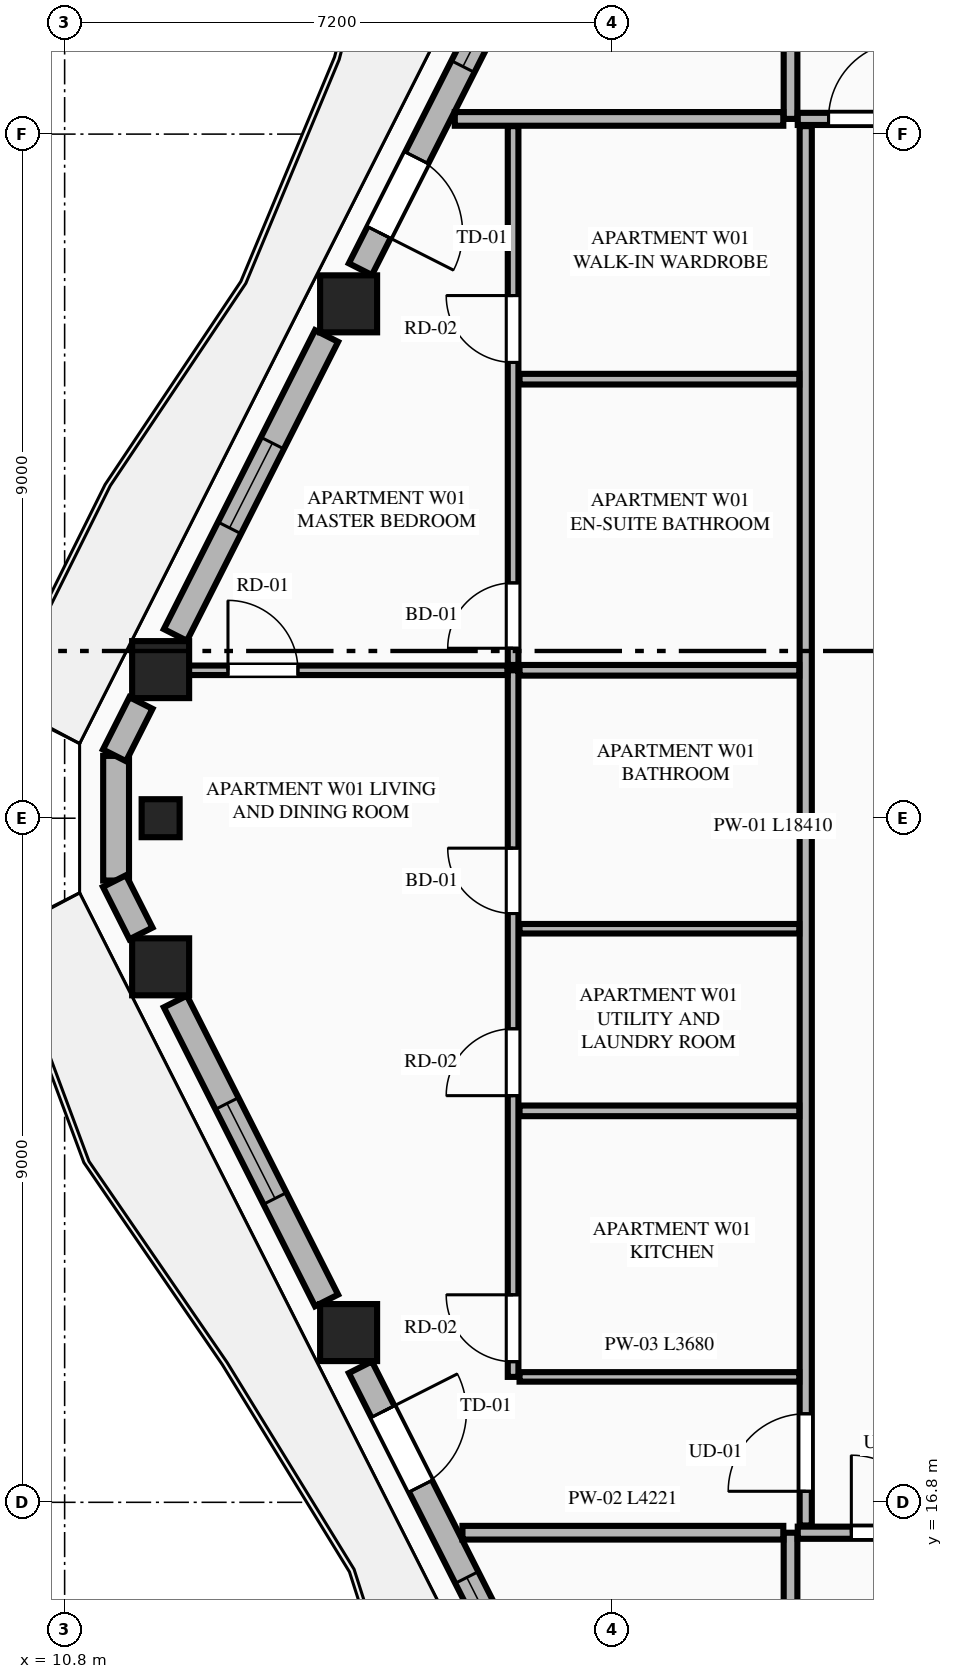
"""IFC4 building model, lengths in metres.
Left out: names, types, materials, properties, quantities, classifications, styles, units other than length and angle.
Written with IfcOpenShell. Run it as: python <this file> out.ifc"""

import sys

from ifc_helpers import new_model, si_unit, direction, frame, frame_2d, origin, origin_2d, place, context, subcontext, project, spatial, rectangle, extrude, element, fill, save


model = new_model("IFC4")
c1 = context("Model", 3, precision=1e-05, world=origin(), true_north=direction((0.0, 1.0)))
c2 = subcontext(c1, "Body", "Model", "MODEL_VIEW")
j1 = project(units=[si_unit("LENGTHUNIT", "METRE"), si_unit("PLANEANGLEUNIT", "RADIAN")], contexts=[c1])
p1 = place(None, origin())
s1 = spatial("IfcSite", under=j1, at=p1, CompositionType="ELEMENT")
p2 = place(p1, origin())
s2 = spatial("IfcBuilding", under=s1, at=p2, CompositionType="ELEMENT")
p3 = place(p2, frame((0.0, 0.0, 237.95)))
s3 = spatial("IfcBuildingStorey", under=s2, at=p3, CompositionType="ELEMENT", Elevation=237.95)
for number, where, z_axis, x_axis in (
    (1, (14.536, 32.567, 0.0), (0.0, 0.0, 1.0), (1.0, 0.0, 0.0)),
    (2, (12.063, 27.755, 0.0), (0.0, 0.0, 1.0), (1.0, 0.0, 0.0)),
    (3, (12.063, 23.845, 0.0), (0.0, 0.0, 1.0), (1.0, 0.0, 0.0)),
    (4, (14.536, 19.033, 0.0), (0.0, 0.0, 1.0), (1.0, 0.0, 0.0)),
):
    element("IfcColumn", number, at=place(p3, frame(where, z_axis=z_axis, x_axis=x_axis)), inside=s3, PredefinedType="COLUMN", context=c2, shape_type="SweptSolid", body=[
        extrude(rectangle(XDim=0.75, YDim=0.75, at=origin_2d()), origin(), (0.0, 0.0, 1.0), 3.65),
    ])
p4 = place(p3, frame((12.063, 25.8, 0.0), z_axis=(0.0, 0.0, 1.0), x_axis=(0.0, -1.0, 0.0)))
e5 = element("IfcColumn", 5, at=p4, inside=s3, PredefinedType="PILASTER", context=c2, shape_type="SweptSolid", body=[
    extrude(rectangle(XDim=0.5, YDim=0.35, at=origin_2d()), origin(), (0.0, 0.0, 1.0), 3.65),
])
p5 = place(p3, frame((11.477, 26.62, 0.0), z_axis=(0.0, 0.0, 1.0), x_axis=(0.0, -1.0, 0.0)))
e6 = element("IfcWall", 6, at=p5, inside=s3, PredefinedType="STANDARD", context=c2, shape_type="SweptSolid", body=[
    extrude(rectangle(XDim=1.64, YDim=0.34, at=frame_2d((0.82, 0.0))), origin(), (0.0, 0.0, 1.0), 3.45),
])
p6 = place(p3, frame((16.768, 37.127, 0.0), z_axis=(0.0, 0.0, 1.0), x_axis=(-0.451581819983, -0.892229712496, 0.0)))
e7 = element("IfcWall", 7, at=p6, inside=s3, PredefinedType="STANDARD", context=c2, shape_type="SweptSolid", body=[
    extrude(rectangle(XDim=4.6, YDim=0.34, at=frame_2d((2.3, 0.0))), origin(), (0.0, 0.0, 1.0), 2.983),
])
p7 = place(p6, frame((2.958, 0.0, 0.0)))
e8 = element("IfcOpeningElement", 8, at=p7, cuts=e7, PredefinedType="OPENING", context=c2, shape_type="SweptSolid", body=[
    extrude(rectangle(XDim=1.1, YDim=2.25, at=frame_2d((0.55, 1.125))), frame((0.0, 0.18, 0.0), z_axis=(0.0, -1.0, 0.0), x_axis=(1.0, 0.0, 0.0)), (0.0, 0.0, 1.0), 0.36),
])
p8 = place(p6, frame((0.512, 0.0, 0.75)))
e9 = element("IfcOpeningElement", 9, at=p8, cuts=e7, PredefinedType="OPENING", context=c2, shape_type="SweptSolid", body=[
    extrude(rectangle(XDim=1.1, YDim=2.0, at=frame_2d((0.55, 1.0))), frame((0.0, 0.18, 0.0), z_axis=(0.0, -1.0, 0.0), x_axis=(1.0, 0.0, 0.0)), (0.0, 0.0, 1.0), 0.36),
])
p9 = place(p3, frame((14.246, 32.144, 0.0), z_axis=(0.0, 0.0, 1.0), x_axis=(-0.451285866323, -0.892379441077, 0.0)))
e10 = element("IfcWall", 10, at=p9, inside=s3, PredefinedType="STANDARD", context=c2, shape_type="SweptSolid", body=[
    extrude(rectangle(XDim=4.407, YDim=0.34, at=frame_2d((2.204, 0.0))), origin(), (0.0, 0.0, 1.0), 2.983),
])
p10 = place(p9, frame((1.579, 0.0, 0.75)))
e11 = element("IfcOpeningElement", 11, at=p10, cuts=e10, PredefinedType="OPENING", context=c2, shape_type="SweptSolid", body=[
    extrude(rectangle(XDim=1.25, YDim=1.95, at=frame_2d((0.625, 0.975))), frame((0.0, 0.18, 0.0), z_axis=(0.0, -1.0, 0.0), x_axis=(1.0, 0.0, 0.0)), (0.0, 0.0, 1.0), 0.36),
])
for number, where, z_axis, x_axis in (
    (12, (11.804, 27.316, 0.0), (0.0, 0.0, 1.0), (-0.451, -0.893, 0.0)),
    (13, (11.456, 24.973, 0.0), (0.0, 0.0, 1.0), (0.451, -0.893, 0.0)),
):
    element("IfcWall", number, at=place(p3, frame(where, z_axis=z_axis, x_axis=x_axis)), inside=s3, PredefinedType="STANDARD", context=c2, shape_type="SweptSolid", body=[
        extrude(rectangle(XDim=0.772, YDim=0.34, at=frame_2d((0.386, 0.0))), origin(), (0.0, 0.0, 1.0), 3.45),
    ])
p11 = place(p3, frame((12.257, 23.389, 0.0), z_axis=(0.0, 0.0, 1.0), x_axis=(0.45130817501, -0.892368158984, 0.0)))
e14 = element("IfcWall", 14, at=p11, inside=s3, PredefinedType="STANDARD", context=c2, shape_type="SweptSolid", body=[
    extrude(rectangle(XDim=4.407, YDim=0.34, at=frame_2d((2.204, 0.0))), origin(), (0.0, 0.0, 1.0), 2.983),
])
p12 = place(p11, frame((1.504, 0.0, 0.75)))
e15 = element("IfcOpeningElement", 15, at=p12, cuts=e14, PredefinedType="OPENING", context=c2, shape_type="SweptSolid", body=[
    extrude(rectangle(XDim=1.4, YDim=2.05, at=frame_2d((0.7, 1.025))), frame((0.0, 0.18, 0.0), z_axis=(0.0, -1.0, 0.0), x_axis=(1.0, 0.0, 0.0)), (0.0, 0.0, 1.0), 0.36),
])
p13 = place(p3, frame((14.691, 18.577, 0.0), z_axis=(0.0, 0.0, 1.0), x_axis=(0.451581819983, -0.892229712496, 0.0)))
e16 = element("IfcWall", 16, at=p13, inside=s3, PredefinedType="STANDARD", context=c2, shape_type="SweptSolid", body=[
    extrude(rectangle(XDim=4.6, YDim=0.34, at=frame_2d((2.3, 0.0))), origin(), (0.0, 0.0, 1.0), 2.983),
])
p14 = place(p13, frame((0.654, 0.0, 0.0)))
e17 = element("IfcOpeningElement", 17, at=p14, cuts=e16, PredefinedType="OPENING", context=c2, shape_type="SweptSolid", body=[
    extrude(rectangle(XDim=1.1, YDim=2.25, at=frame_2d((0.55, 1.125))), frame((0.0, 0.18, 0.0), z_axis=(0.0, -1.0, 0.0), x_axis=(1.0, 0.0, 0.0)), (0.0, 0.0, 1.0), 0.36),
])
p15 = place(p13, frame((3.1, 0.0, 0.75)))
e18 = element("IfcOpeningElement", 18, at=p15, cuts=e16, PredefinedType="OPENING", context=c2, shape_type="SweptSolid", body=[
    extrude(rectangle(XDim=1.1, YDim=2.0, at=frame_2d((0.55, 1.0))), frame((0.0, 0.18, 0.0), z_axis=(0.0, -1.0, 0.0), x_axis=(1.0, 0.0, 0.0)), (0.0, 0.0, 1.0), 0.36),
])
p16 = place(p3, frame((20.35, 8.119, 0.0), z_axis=(0.0, 0.0, 1.0), x_axis=(0.0, 1.0, 0.0)))
e19 = element("IfcWall", 19, at=p16, inside=s3, PredefinedType="PARTITIONING", context=c2, shape_type="SweptSolid", body=[
    extrude(rectangle(XDim=8.281, YDim=0.18, at=frame_2d((4.141, 0.0))), origin(), (0.0, 0.0, 1.0), 3.45),
])
p17 = place(p3, frame((20.445, 16.4, 0.0), z_axis=(0.0, 0.0, 1.0), x_axis=(1.0, 0.0, 0.0)))
e20 = element("IfcWall", 20, at=p17, inside=s3, PredefinedType="PARTITIONING", context=c2, shape_type="SweptSolid", body=[
    extrude(rectangle(XDim=8.606, YDim=0.16, at=frame_2d((4.303, 0.0))), origin(), (0.0, 0.0, 1.0), 3.45),
])
p18 = place(p17, frame((0.705, 0.0, 0.0)))
e21 = element("IfcOpeningElement", 21, at=p18, cuts=e20, PredefinedType="OPENING", context=c2, shape_type="SweptSolid", body=[
    extrude(rectangle(XDim=1.02, YDim=2.25, at=frame_2d((0.51, 1.125))), frame((0.0, 0.09, 0.0), z_axis=(0.0, -1.0, 0.0), x_axis=(1.0, 0.0, 0.0)), (0.0, 0.0, 1.0), 0.18),
])
p19 = place(p3, frame((20.35, 35.0, 0.0), z_axis=(0.0, 0.0, 1.0), x_axis=(0.0, 1.0, 0.0)))
e22 = element("IfcWall", 22, at=p19, inside=s3, PredefinedType="PARTITIONING", context=c2, shape_type="SweptSolid", body=[
    extrude(rectangle(XDim=8.481, YDim=0.18, at=frame_2d((4.24, 0.0))), origin(), (0.0, 0.0, 1.0), 3.45),
])
p20 = place(p3, frame((20.445, 35.0, 0.0), z_axis=(0.0, 0.0, 1.0), x_axis=(1.0, 0.0, 0.0)))
e23 = element("IfcWall", 23, at=p20, inside=s3, PredefinedType="PARTITIONING", context=c2, shape_type="SweptSolid", body=[
    extrude(rectangle(XDim=8.606, YDim=0.16, at=frame_2d((4.303, 0.0))), origin(), (0.0, 0.0, 1.0), 3.45),
])
p21 = place(p20, frame((0.405, 0.0, 0.0)))
e24 = element("IfcOpeningElement", 24, at=p21, cuts=e23, PredefinedType="OPENING", context=c2, shape_type="SweptSolid", body=[
    extrude(rectangle(XDim=1.02, YDim=2.25, at=frame_2d((0.51, 1.125))), frame((0.0, 0.09, 0.0), z_axis=(0.0, -1.0, 0.0), x_axis=(1.0, 0.0, 0.0)), (0.0, 0.0, 1.0), 0.18),
])
p22 = place(p3, frame((16.034, 16.4, 0.0), z_axis=(0.0, 0.0, 1.0), x_axis=(1.0, 0.0, 0.0)))
e25 = element("IfcWall", 25, at=p22, inside=s3, PredefinedType="PARTITIONING", context=c2, shape_type="SweptSolid", body=[
    extrude(rectangle(XDim=4.221, YDim=0.18, at=frame_2d((2.11, 0.0))), origin(), (0.0, 0.0, 1.0), 3.45),
])
p23 = place(p3, frame((15.933, 35.0, 0.0), z_axis=(0.0, 0.0, 1.0), x_axis=(1.0, 0.0, 0.0)))
e26 = element("IfcWall", 26, at=p23, inside=s3, PredefinedType="PARTITIONING", context=c2, shape_type="SweptSolid", body=[
    extrude(rectangle(XDim=4.322, YDim=0.18, at=frame_2d((2.161, 0.0))), origin(), (0.0, 0.0, 1.0), 3.45),
])
p24 = place(p3, frame((20.55, 16.495, 0.0), z_axis=(0.0, 0.0, 1.0), x_axis=(0.0, 1.0, 0.0)))
e27 = element("IfcWall", 27, at=p24, inside=s3, PredefinedType="PARTITIONING", context=c2, shape_type="SweptSolid", body=[
    extrude(rectangle(XDim=18.41, YDim=0.16, at=frame_2d((9.205, 0.0))), origin(), (0.0, 0.0, 1.0), 3.137),
])
p25 = place(p24, frame((0.45, 0.0, 0.0)))
e28 = element("IfcOpeningElement", 28, at=p25, cuts=e27, PredefinedType="OPENING", context=c2, shape_type="SweptSolid", body=[
    extrude(rectangle(XDim=1.02, YDim=2.25, at=frame_2d((0.51, 1.125))), frame((0.0, 0.09, 0.0), z_axis=(0.0, -1.0, 0.0), x_axis=(1.0, 0.0, 0.0)), (0.0, 0.0, 1.0), 0.18),
])
p26 = place(p3, frame((16.785, 18.45, 0.0), z_axis=(0.0, 0.0, 1.0), x_axis=(1.0, 0.0, 0.0)))
e29 = element("IfcWall", 29, at=p26, inside=s3, PredefinedType="PARTITIONING", context=c2, shape_type="SweptSolid", body=[
    extrude(rectangle(XDim=3.68, YDim=0.125, at=frame_2d((1.84, 0.0))), origin(), (0.0, 0.0, 1.0), 3.45),
])
p27 = place(p3, frame((16.7, 18.45, 0.0), z_axis=(0.0, 0.0, 1.0), x_axis=(0.0, 1.0, 0.0)))
e30 = element("IfcWall", 30, at=p27, inside=s3, PredefinedType="PLUMBINGWALL", context=c2, shape_type="SweptSolid", body=[
    extrude(rectangle(XDim=9.296, YDim=0.14, at=frame_2d((4.648, 0.0))), origin(), (0.0, 0.0, 1.0), 3.45),
])
p28 = place(p27, frame((0.2, 0.0, 0.0)))
e31 = element("IfcOpeningElement", 31, at=p28, cuts=e30, PredefinedType="OPENING", context=c2, shape_type="SweptSolid", body=[
    extrude(rectangle(XDim=0.88, YDim=2.15, at=frame_2d((0.44, 1.075))), frame((0.0, 0.08, 0.0), z_axis=(0.0, -1.0, 0.0), x_axis=(1.0, 0.0, 0.0)), (0.0, 0.0, 1.0), 0.16),
])
p29 = place(p27, frame((3.7, 0.0, 0.0)))
e32 = element("IfcOpeningElement", 32, at=p29, cuts=e30, PredefinedType="OPENING", context=c2, shape_type="SweptSolid", body=[
    extrude(rectangle(XDim=0.88, YDim=2.15, at=frame_2d((0.44, 1.075))), frame((0.0, 0.08, 0.0), z_axis=(0.0, -1.0, 0.0), x_axis=(1.0, 0.0, 0.0)), (0.0, 0.0, 1.0), 0.16),
])
p30 = place(p27, frame((6.096, 0.0, 0.0)))
e33 = element("IfcOpeningElement", 33, at=p30, cuts=e30, PredefinedType="OPENING", context=c2, shape_type="SweptSolid", body=[
    extrude(rectangle(XDim=0.86, YDim=2.1, at=frame_2d((0.43, 1.05))), frame((0.0, 0.08, 0.0), z_axis=(0.0, -1.0, 0.0), x_axis=(1.0, 0.0, 0.0)), (0.0, 0.0, 1.0), 0.16),
])
p31 = place(p3, frame((16.7, 27.816, 0.0), z_axis=(0.0, 0.0, 1.0), x_axis=(0.0, 1.0, 0.0)))
e34 = element("IfcWall", 34, at=p31, inside=s3, PredefinedType="PLUMBINGWALL", context=c2, shape_type="SweptSolid", body=[
    extrude(rectangle(XDim=7.089, YDim=0.14, at=frame_2d((3.544, 0.0))), origin(), (0.0, 0.0, 1.0), 3.45),
])
p32 = place(p31, frame((0.22, 0.0, 0.0)))
e35 = element("IfcOpeningElement", 35, at=p32, cuts=e34, PredefinedType="OPENING", context=c2, shape_type="SweptSolid", body=[
    extrude(rectangle(XDim=0.86, YDim=2.1, at=frame_2d((0.43, 1.05))), frame((0.0, 0.08, 0.0), z_axis=(0.0, -1.0, 0.0), x_axis=(1.0, 0.0, 0.0)), (0.0, 0.0, 1.0), 0.16),
])
p33 = place(p31, frame((3.98, 0.0, 0.0)))
e36 = element("IfcOpeningElement", 36, at=p33, cuts=e34, PredefinedType="OPENING", context=c2, shape_type="SweptSolid", body=[
    extrude(rectangle(XDim=0.88, YDim=2.15, at=frame_2d((0.44, 1.075))), frame((0.0, 0.08, 0.0), z_axis=(0.0, -1.0, 0.0), x_axis=(1.0, 0.0, 0.0)), (0.0, 0.0, 1.0), 0.16),
])
p34 = place(p3, frame((16.785, 27.746, 0.0), z_axis=(0.0, 0.0, 1.0), x_axis=(1.0, 0.0, 0.0)))
e37 = element("IfcWall", 37, at=p34, inside=s3, PredefinedType="PLUMBINGWALL", context=c2, shape_type="SweptSolid", body=[
    extrude(rectangle(XDim=3.68, YDim=0.14, at=frame_2d((1.84, 0.0))), origin(), (0.0, 0.0, 1.0), 2.907),
])
p35 = place(p3, frame((12.249, 27.746, 0.0), z_axis=(0.0, 0.0, 1.0), x_axis=(1.0, 0.0, 0.0)))
e38 = element("IfcWall", 38, at=p35, inside=s3, PredefinedType="PARTITIONING", context=c2, shape_type="SweptSolid", body=[
    extrude(rectangle(XDim=4.376, YDim=0.125, at=frame_2d((2.188, 0.0))), origin(), (0.0, 0.0, 1.0), 2.907),
])
p36 = place(p35, frame((0.7, 0.0, 0.0)))
e39 = element("IfcOpeningElement", 39, at=p36, cuts=e38, PredefinedType="OPENING", context=c2, shape_type="SweptSolid", body=[
    extrude(rectangle(XDim=0.92, YDim=2.15, at=frame_2d((0.46, 1.075))), frame((0.0, 0.073, 0.0), z_axis=(0.0, -1.0, 0.0), x_axis=(1.0, 0.0, 0.0)), (0.0, 0.0, 1.0), 0.145),
])
p37 = place(p3, frame((16.785, 21.95, 0.0), z_axis=(0.0, 0.0, 1.0), x_axis=(1.0, 0.0, 0.0)))
e40 = element("IfcWall", 40, at=p37, inside=s3, PredefinedType="PLUMBINGWALL", context=c2, shape_type="SweptSolid", body=[
    extrude(rectangle(XDim=3.68, YDim=0.14, at=frame_2d((1.84, 0.0))), origin(), (0.0, 0.0, 1.0), 3.45),
])
p38 = place(p3, frame((16.785, 24.346, 0.0), z_axis=(0.0, 0.0, 1.0), x_axis=(1.0, 0.0, 0.0)))
e41 = element("IfcWall", 41, at=p38, inside=s3, PredefinedType="PARTITIONING", context=c2, shape_type="SweptSolid", body=[
    extrude(rectangle(XDim=3.68, YDim=0.125, at=frame_2d((1.84, 0.0))), origin(), (0.0, 0.0, 1.0), 3.45),
])
p39 = place(p3, frame((16.785, 31.576, 0.0), z_axis=(0.0, 0.0, 1.0), x_axis=(1.0, 0.0, 0.0)))
e42 = element("IfcWall", 42, at=p39, inside=s3, PredefinedType="PLUMBINGWALL", context=c2, shape_type="SweptSolid", body=[
    extrude(rectangle(XDim=3.68, YDim=0.14, at=frame_2d((1.84, 0.0))), origin(), (0.0, 0.0, 1.0), 3.45),
])
p40 = place(p7, origin())
e43 = element("IfcDoor", 43, at=p40, inside=s3, OperationType="SINGLE_SWING_RIGHT", PredefinedType="DOOR", context=c2, shape_type="SweptSolid", body=[
    extrude(rectangle(XDim=1.1, YDim=2.25, at=frame_2d((0.55, 1.125))), frame((0.0, 0.025, 0.0), z_axis=(0.0, -1.0, 0.0), x_axis=(1.0, 0.0, 0.0)), (0.0, 0.0, 1.0), 0.05),
])
fill(e8, e43)
p41 = place(p10, origin())
e44 = element("IfcWindow", 44, at=p41, inside=s3, PartitioningType="SINGLE_PANEL", PredefinedType="WINDOW", context=c2, shape_type="SweptSolid", body=[
    extrude(rectangle(XDim=1.25, YDim=1.95, at=frame_2d((0.625, 0.975))), frame((0.0, 0.03, 0.0), z_axis=(0.0, -1.0, 0.0), x_axis=(1.0, 0.0, 0.0)), (0.0, 0.0, 1.0), 0.06),
])
fill(e11, e44)
p42 = place(p12, origin())
e45 = element("IfcWindow", 45, at=p42, inside=s3, PartitioningType="SINGLE_PANEL", PredefinedType="WINDOW", context=c2, shape_type="SweptSolid", body=[
    extrude(rectangle(XDim=1.4, YDim=2.05, at=frame_2d((0.7, 1.025))), frame((0.0, 0.03, 0.0), z_axis=(0.0, -1.0, 0.0), x_axis=(1.0, 0.0, 0.0)), (0.0, 0.0, 1.0), 0.06),
])
fill(e15, e45)
p43 = place(p14, origin())
e46 = element("IfcDoor", 46, at=p43, inside=s3, OperationType="SINGLE_SWING_LEFT", PredefinedType="DOOR", context=c2, shape_type="SweptSolid", body=[
    extrude(rectangle(XDim=1.1, YDim=2.25, at=frame_2d((0.55, 1.125))), frame((0.0, 0.025, 0.0), z_axis=(0.0, -1.0, 0.0), x_axis=(1.0, 0.0, 0.0)), (0.0, 0.0, 1.0), 0.05),
])
fill(e17, e46)
p44 = place(p18, origin())
e47 = element("IfcDoor", 47, at=p44, inside=s3, OperationType="SINGLE_SWING_LEFT", PredefinedType="DOOR", context=c2, shape_type="SweptSolid", body=[
    extrude(rectangle(XDim=1.02, YDim=2.25, at=frame_2d((0.51, 1.125))), frame((0.0, 0.025, 0.0), z_axis=(0.0, -1.0, 0.0), x_axis=(1.0, 0.0, 0.0)), (0.0, 0.0, 1.0), 0.05),
])
fill(e21, e47)
p45 = place(p21, origin())
e48 = element("IfcDoor", 48, at=p45, inside=s3, OperationType="SINGLE_SWING_RIGHT", PredefinedType="DOOR", context=c2, shape_type="SweptSolid", body=[
    extrude(rectangle(XDim=1.02, YDim=2.25, at=frame_2d((0.51, 1.125))), frame((0.0, 0.025, 0.0), z_axis=(0.0, -1.0, 0.0), x_axis=(1.0, 0.0, 0.0)), (0.0, 0.0, 1.0), 0.05),
])
fill(e24, e48)
p46 = place(p28, origin())
e49 = element("IfcDoor", 49, at=p46, inside=s3, OperationType="SINGLE_SWING_RIGHT", PredefinedType="DOOR", context=c2, shape_type="SweptSolid", body=[
    extrude(rectangle(XDim=0.88, YDim=2.15, at=frame_2d((0.44, 1.075))), frame((0.0, 0.025, 0.0), z_axis=(0.0, -1.0, 0.0), x_axis=(1.0, 0.0, 0.0)), (0.0, 0.0, 1.0), 0.05),
])
fill(e31, e49)
p47 = place(p29, origin())
e50 = element("IfcDoor", 50, at=p47, inside=s3, OperationType="SINGLE_SWING_LEFT", PredefinedType="DOOR", context=c2, shape_type="SweptSolid", body=[
    extrude(rectangle(XDim=0.88, YDim=2.15, at=frame_2d((0.44, 1.075))), frame((0.0, 0.025, 0.0), z_axis=(0.0, -1.0, 0.0), x_axis=(1.0, 0.0, 0.0)), (0.0, 0.0, 1.0), 0.05),
])
fill(e32, e50)
p48 = place(p30, origin())
e51 = element("IfcDoor", 51, at=p48, inside=s3, OperationType="SINGLE_SWING_RIGHT", PredefinedType="DOOR", context=c2, shape_type="SweptSolid", body=[
    extrude(rectangle(XDim=0.86, YDim=2.1, at=frame_2d((0.43, 1.05))), frame((0.0, 0.025, 0.0), z_axis=(0.0, -1.0, 0.0), x_axis=(1.0, 0.0, 0.0)), (0.0, 0.0, 1.0), 0.05),
])
fill(e33, e51)
p49 = place(p32, origin())
e52 = element("IfcDoor", 52, at=p49, inside=s3, OperationType="SINGLE_SWING_LEFT", PredefinedType="DOOR", context=c2, shape_type="SweptSolid", body=[
    extrude(rectangle(XDim=0.86, YDim=2.1, at=frame_2d((0.43, 1.05))), frame((0.0, 0.025, 0.0), z_axis=(0.0, -1.0, 0.0), x_axis=(1.0, 0.0, 0.0)), (0.0, 0.0, 1.0), 0.05),
])
fill(e35, e52)
p50 = place(p33, origin())
e53 = element("IfcDoor", 53, at=p50, inside=s3, OperationType="SINGLE_SWING_RIGHT", PredefinedType="DOOR", context=c2, shape_type="SweptSolid", body=[
    extrude(rectangle(XDim=0.88, YDim=2.15, at=frame_2d((0.44, 1.075))), frame((0.0, 0.025, 0.0), z_axis=(0.0, -1.0, 0.0), x_axis=(1.0, 0.0, 0.0)), (0.0, 0.0, 1.0), 0.05),
])
fill(e36, e53)
p51 = place(p25, origin())
e54 = element("IfcDoor", 54, at=p51, inside=s3, OperationType="SINGLE_SWING_LEFT", PredefinedType="DOOR", context=c2, shape_type="SweptSolid", body=[
    extrude(rectangle(XDim=1.02, YDim=2.25, at=frame_2d((0.51, 1.125))), frame((0.0, 0.025, 0.0), z_axis=(0.0, -1.0, 0.0), x_axis=(1.0, 0.0, 0.0)), (0.0, 0.0, 1.0), 0.05),
])
fill(e28, e54)
p52 = place(p36, origin())
e55 = element("IfcDoor", 55, at=p52, inside=s3, OperationType="SINGLE_SWING_LEFT", PredefinedType="DOOR", context=c2, shape_type="SweptSolid", body=[
    extrude(rectangle(XDim=0.92, YDim=2.15, at=frame_2d((0.46, 1.075))), frame((0.0, 0.025, 0.0), z_axis=(0.0, -1.0, 0.0), x_axis=(1.0, 0.0, 0.0)), (0.0, 0.0, 1.0), 0.05),
])
fill(e39, e55)
p53 = place(p8, origin())
e56 = element("IfcWindow", 56, at=p53, inside=s3, PartitioningType="SINGLE_PANEL", PredefinedType="WINDOW", context=c2, shape_type="SweptSolid", body=[
    extrude(rectangle(XDim=1.1, YDim=2.0, at=frame_2d((0.55, 1.0))), frame((0.0, 0.03, 0.0), z_axis=(0.0, -1.0, 0.0), x_axis=(1.0, 0.0, 0.0)), (0.0, 0.0, 1.0), 0.06),
])
fill(e9, e56)
p54 = place(p15, origin())
e57 = element("IfcWindow", 57, at=p54, inside=s3, PartitioningType="SINGLE_PANEL", PredefinedType="WINDOW", context=c2, shape_type="SweptSolid", body=[
    extrude(rectangle(XDim=1.1, YDim=2.0, at=frame_2d((0.55, 1.0))), frame((0.0, 0.03, 0.0), z_axis=(0.0, -1.0, 0.0), x_axis=(1.0, 0.0, 0.0)), (0.0, 0.0, 1.0), 0.06),
])
fill(e18, e57)
save(model, sys.argv[1])
